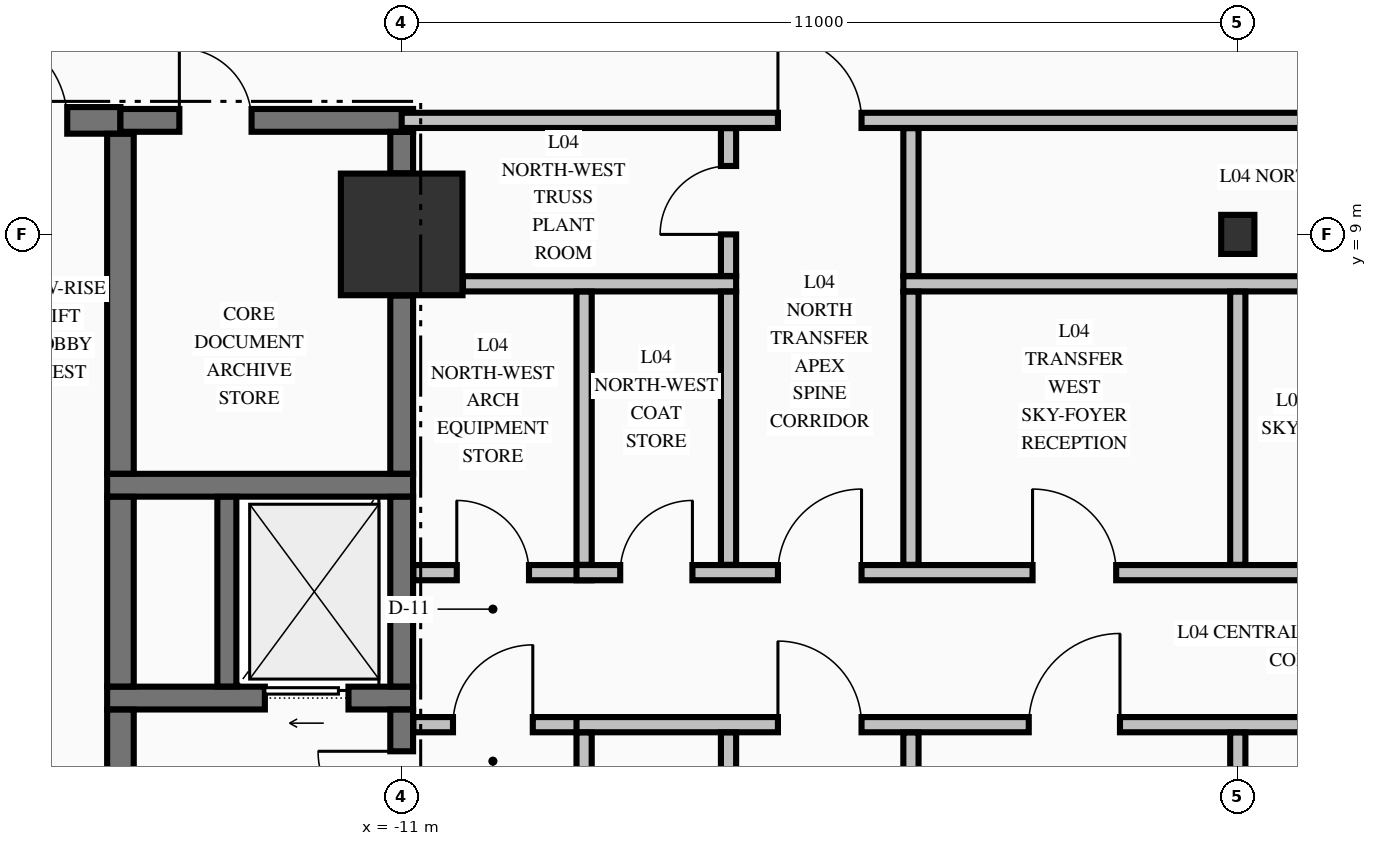
"""IFC4 building model, lengths in metres.
Left out: names, types, materials, properties, quantities, classifications, styles, units other than length and angle.
Written with IfcOpenShell. Run it as: python <this file> out.ifc"""

import sys

from ifc_helpers import new_model, si_unit, direction, frame, frame_2d, origin, origin_2d, place, context, subcontext, project, spatial, rectangle, i_section, extrude, element, fill, save


model = new_model("IFC4")
c1 = context("Model", 3, precision=1e-05, world=origin(), true_north=direction((0.0, 1.0)))
c2 = subcontext(c1, "Body", "Model", "MODEL_VIEW")
j1 = project(units=[si_unit("LENGTHUNIT", "METRE"), si_unit("PLANEANGLEUNIT", "RADIAN")], contexts=[c1])
p1 = place(None, origin())
s1 = spatial("IfcSite", under=j1, at=p1, CompositionType="ELEMENT")
p2 = place(p1, origin())
s2 = spatial("IfcBuilding", under=s1, at=p2, CompositionType="ELEMENT")
p3 = place(p2, frame((0.0, 0.0, 21.76)))
s3 = spatial("IfcBuildingStorey", under=s2, at=p3, CompositionType="ELEMENT", Elevation=21.76)
p4 = place(p3, frame((-11.0, 9.0, -0.45), z_axis=(0.0, 0.0, 1.0), x_axis=(1.0, 0.0, 0.0)))
e1 = element("IfcColumn", 1, at=p4, inside=s3, PredefinedType="COLUMN", context=c2, shape_type="SweptSolid", body=[
    extrude(rectangle(XDim=1.6, YDim=1.6, at=origin_2d()), origin(), (0.0, 0.0, 1.0), 5.44),
])
p5 = place(p3, frame((0.0, 9.0, -0.45), z_axis=(0.0, 0.0, 1.0), x_axis=(1.0, 0.0, 0.0)))
e2 = element("IfcColumn", 2, at=p5, inside=s3, PredefinedType="COLUMN", context=c2, shape_type="SweptSolid", body=[
    extrude(i_section(OverallWidth=0.437, OverallDepth=0.514, WebThickness=0.061, FlangeThickness=0.097, FilletRadius=0.015, at=origin_2d()), origin(), (0.0, 0.0, 1.0), 5.44),
])
p6 = place(p3, frame((-14.875, 2.9, 0.0), z_axis=(0.0, 0.0, 1.0), x_axis=(1.0, 0.0, 0.0)))
e3 = element("IfcWall", 3, at=p6, inside=s3, PredefinedType="SHEAR", context=c2, shape_type="SweptSolid", body=[
    extrude(rectangle(XDim=4.025, YDim=0.3, at=frame_2d((2.012, 0.0))), origin(), (0.0, 0.0, 1.0), 4.99),
])
p7 = place(p6, frame((2.075, 0.0, 0.0)))
e4 = element("IfcOpeningElement", 4, at=p7, cuts=e3, PredefinedType="OPENING", context=c2, shape_type="SweptSolid", body=[
    extrude(rectangle(XDim=1.1, YDim=2.2, at=frame_2d((0.55, 1.1))), frame((0.0, 0.16, 0.0), z_axis=(0.0, -1.0, 0.0), x_axis=(1.0, 0.0, 0.0)), (0.0, 0.0, 1.0), 0.32),
])
p8 = place(p3, frame((-14.875, 5.7, 0.0), z_axis=(0.0, 0.0, 1.0), x_axis=(1.0, 0.0, 0.0)))
e5 = element("IfcWall", 5, at=p8, inside=s3, PredefinedType="SHEAR", context=c2, shape_type="SweptSolid", body=[
    extrude(rectangle(XDim=4.025, YDim=0.3, at=frame_2d((2.012, 0.0))), origin(), (0.0, 0.0, 1.0), 4.99),
])
p9 = place(p3, frame((-20.175, 10.5, 0.0), z_axis=(0.0, 0.0, 1.0), x_axis=(1.0, 0.0, 0.0)))
e6 = element("IfcWall", 6, at=p9, inside=s3, PredefinedType="SHEAR", context=c2, shape_type="SweptSolid", body=[
    extrude(rectangle(XDim=5.475, YDim=0.35, at=frame_2d((2.738, 0.0))), origin(), (0.0, 0.0, 1.0), 4.99),
])
p10 = place(p9, frame((3.575, 0.0, 0.0)))
e7 = element("IfcOpeningElement", 7, at=p10, cuts=e6, PredefinedType="OPENING", context=c2, shape_type="SweptSolid", body=[
    extrude(rectangle(XDim=1.2, YDim=2.15, at=frame_2d((0.6, 1.075))), frame((0.0, 0.185, 0.0), z_axis=(0.0, -1.0, 0.0), x_axis=(1.0, 0.0, 0.0)), (0.0, 0.0, 1.0), 0.37),
])
p11 = place(p3, frame((-14.7, 10.5, 0.0), z_axis=(0.0, 0.0, 1.0), x_axis=(1.0, 0.0, 0.0)))
e8 = element("IfcWall", 8, at=p11, inside=s3, PredefinedType="SHEAR", context=c2, shape_type="SweptSolid", body=[
    extrude(rectangle(XDim=3.85, YDim=0.3, at=frame_2d((1.925, 0.0))), origin(), (0.0, 0.0, 1.0), 4.99),
])
p12 = place(p11, frame((0.775, 0.0, 0.0)))
e9 = element("IfcOpeningElement", 9, at=p12, cuts=e8, PredefinedType="OPENING", context=c2, shape_type="SweptSolid", body=[
    extrude(rectangle(XDim=0.95, YDim=2.15, at=frame_2d((0.475, 1.075))), frame((0.0, 0.16, 0.0), z_axis=(0.0, -1.0, 0.0), x_axis=(1.0, 0.0, 0.0)), (0.0, 0.0, 1.0), 0.32),
])
p13 = place(p3, frame((-10.847, 2.55, 0.0), z_axis=(0.0, 0.0, 1.0), x_axis=(1.0, 0.0, 0.0)))
e10 = element("IfcWall", 10, at=p13, inside=s3, PredefinedType="PARTITIONING", context=c2, shape_type="SweptSolid", body=[
    extrude(rectangle(XDim=2.347, YDim=0.2, at=frame_2d((1.173, 0.0))), origin(), (0.0, 0.0, 1.0), 4.99),
])
p14 = place(p13, frame((0.522, 0.0, 0.0)))
e11 = element("IfcOpeningElement", 11, at=p14, cuts=e10, PredefinedType="OPENING", context=c2, shape_type="SweptSolid", body=[
    extrude(rectangle(XDim=1.05, YDim=2.15, at=frame_2d((0.525, 1.075))), frame((0.0, 0.11, 0.0), z_axis=(0.0, -1.0, 0.0), x_axis=(1.0, 0.0, 0.0)), (0.0, 0.0, 1.0), 0.22),
])
p15 = place(p3, frame((-8.7, 2.55, 0.0), z_axis=(0.0, 0.0, 1.0), x_axis=(1.0, 0.0, 0.0)))
e12 = element("IfcWall", 12, at=p15, inside=s3, PredefinedType="PARTITIONING", context=c2, shape_type="SweptSolid", body=[
    extrude(rectangle(XDim=17.4, YDim=0.2, at=frame_2d((8.7, 0.0))), origin(), (0.0, 0.0, 1.0), 4.99),
])
p16 = place(p15, frame((2.65, 0.0, 0.0)))
e13 = element("IfcOpeningElement", 13, at=p16, cuts=e12, PredefinedType="OPENING", context=c2, shape_type="SweptSolid", body=[
    extrude(rectangle(XDim=1.1, YDim=2.15, at=frame_2d((0.55, 1.075))), frame((0.0, 0.11, 0.0), z_axis=(0.0, -1.0, 0.0), x_axis=(1.0, 0.0, 0.0)), (0.0, 0.0, 1.0), 0.22),
])
p17 = place(p15, frame((5.95, 0.0, 0.0)))
e14 = element("IfcOpeningElement", 14, at=p17, cuts=e12, PredefinedType="OPENING", context=c2, shape_type="SweptSolid", body=[
    extrude(rectangle(XDim=1.2, YDim=2.15, at=frame_2d((0.6, 1.075))), frame((0.0, 0.11, 0.0), z_axis=(0.0, -1.0, 0.0), x_axis=(1.0, 0.0, 0.0)), (0.0, 0.0, 1.0), 0.22),
])
p18 = place(p3, frame((-10.847, 4.55, 0.0), z_axis=(0.0, 0.0, 1.0), x_axis=(1.0, 0.0, 0.0)))
e15 = element("IfcWall", 15, at=p18, inside=s3, PredefinedType="PARTITIONING", context=c2, shape_type="SweptSolid", body=[
    extrude(rectangle(XDim=2.347, YDim=0.2, at=frame_2d((1.173, 0.0))), origin(), (0.0, 0.0, 1.0), 4.99),
])
p19 = place(p18, frame((0.572, 0.0, 0.0)))
e16 = element("IfcOpeningElement", 16, at=p19, cuts=e15, PredefinedType="OPENING", context=c2, shape_type="SweptSolid", body=[
    extrude(rectangle(XDim=0.95, YDim=2.15, at=frame_2d((0.475, 1.075))), frame((0.0, 0.11, 0.0), z_axis=(0.0, -1.0, 0.0), x_axis=(1.0, 0.0, 0.0)), (0.0, 0.0, 1.0), 0.22),
])
p20 = place(p3, frame((-8.7, 4.55, 0.0), z_axis=(0.0, 0.0, 1.0), x_axis=(1.0, 0.0, 0.0)))
e17 = element("IfcWall", 17, at=p20, inside=s3, PredefinedType="PARTITIONING", context=c2, shape_type="SweptSolid", body=[
    extrude(rectangle(XDim=17.4, YDim=0.2, at=frame_2d((8.7, 0.0))), origin(), (0.0, 0.0, 1.0), 4.99),
])
p21 = place(p20, frame((2.65, 0.0, 0.0)))
e18 = element("IfcOpeningElement", 18, at=p21, cuts=e17, PredefinedType="OPENING", context=c2, shape_type="SweptSolid", body=[
    extrude(rectangle(XDim=1.1, YDim=2.15, at=frame_2d((0.55, 1.075))), frame((0.0, 0.11, 0.0), z_axis=(0.0, -1.0, 0.0), x_axis=(1.0, 0.0, 0.0)), (0.0, 0.0, 1.0), 0.22),
])
p22 = place(p20, frame((0.575, 0.0, 0.0)))
e19 = element("IfcOpeningElement", 19, at=p22, cuts=e17, PredefinedType="OPENING", context=c2, shape_type="SweptSolid", body=[
    extrude(rectangle(XDim=0.95, YDim=2.15, at=frame_2d((0.475, 1.075))), frame((0.0, 0.11, 0.0), z_axis=(0.0, -1.0, 0.0), x_axis=(1.0, 0.0, 0.0)), (0.0, 0.0, 1.0), 0.22),
])
p23 = place(p20, frame((6.0, 0.0, 0.0)))
e20 = element("IfcOpeningElement", 20, at=p23, cuts=e17, PredefinedType="OPENING", context=c2, shape_type="SweptSolid", body=[
    extrude(rectangle(XDim=1.1, YDim=2.15, at=frame_2d((0.55, 1.075))), frame((0.0, 0.11, 0.0), z_axis=(0.0, -1.0, 0.0), x_axis=(1.0, 0.0, 0.0)), (0.0, 0.0, 1.0), 0.22),
])
p24 = place(p20, frame((12.4, 0.0, 0.0)))
e21 = element("IfcOpeningElement", 21, at=p24, cuts=e17, PredefinedType="OPENING", context=c2, shape_type="SweptSolid", body=[
    extrude(rectangle(XDim=1.2, YDim=2.15, at=frame_2d((0.6, 1.075))), frame((0.0, 0.11, 0.0), z_axis=(0.0, -1.0, 0.0), x_axis=(1.0, 0.0, 0.0)), (0.0, 0.0, 1.0), 0.22),
])
p25 = place(p3, frame((-10.194, 8.35, 0.0), z_axis=(0.0, 0.0, 1.0), x_axis=(1.0, 0.0, 0.0)))
e22 = element("IfcWall", 22, at=p25, inside=s3, PredefinedType="PARTITIONING", context=c2, shape_type="SweptSolid", body=[
    extrude(rectangle(XDim=3.594, YDim=0.2, at=frame_2d((1.797, 0.0))), origin(), (0.0, 0.0, 1.0), 3.332),
])
p26 = place(p3, frame((-4.4, 8.35, 0.0), z_axis=(0.0, 0.0, 1.0), x_axis=(1.0, 0.0, 0.0)))
e23 = element("IfcWall", 23, at=p26, inside=s3, PredefinedType="PARTITIONING", context=c2, shape_type="SweptSolid", body=[
    extrude(rectangle(XDim=14.594, YDim=0.2, at=frame_2d((7.297, 0.0))), origin(), (0.0, 0.0, 1.0), 3.332),
])
p27 = place(p3, frame((-11.0, 10.5, 0.0), z_axis=(0.0, 0.0, 1.0), x_axis=(1.0, 0.0, 0.0)))
e24 = element("IfcWall", 24, at=p27, inside=s3, PredefinedType="PARTITIONING", context=c2, shape_type="SweptSolid", body=[
    extrude(rectangle(XDim=22.0, YDim=0.2, at=frame_2d((11.0, 0.0))), origin(), (0.0, 0.0, 1.0), 3.332),
])
p28 = place(p27, frame((4.95, 0.0, 0.0)))
e25 = element("IfcOpeningElement", 25, at=p28, cuts=e24, PredefinedType="OPENING", context=c2, shape_type="SweptSolid", body=[
    extrude(rectangle(XDim=1.1, YDim=2.15, at=frame_2d((0.55, 1.075))), frame((0.0, 0.11, 0.0), z_axis=(0.0, -1.0, 0.0), x_axis=(1.0, 0.0, 0.0)), (0.0, 0.0, 1.0), 0.22),
])
p29 = place(p27, frame((15.975, 0.0, 0.0)))
e26 = element("IfcOpeningElement", 26, at=p29, cuts=e24, PredefinedType="OPENING", context=c2, shape_type="SweptSolid", body=[
    extrude(rectangle(XDim=1.05, YDim=2.15, at=frame_2d((0.525, 1.075))), frame((0.0, 0.11, 0.0), z_axis=(0.0, -1.0, 0.0), x_axis=(1.0, 0.0, 0.0)), (0.0, 0.0, 1.0), 0.22),
])
p30 = place(p3, frame((-14.7, -0.098, 0.0), z_axis=(0.0, 0.0, 1.0), x_axis=(0.0, 1.0, 0.0)))
e27 = element("IfcWall", 27, at=p30, inside=s3, PredefinedType="SHEAR", context=c2, shape_type="SweptSolid", body=[
    extrude(rectangle(XDim=2.846, YDim=0.35, at=frame_2d((1.423, 0.0))), origin(), (0.0, 0.0, 1.0), 4.99),
])
p31 = place(p3, frame((-14.7, 3.052, 0.0), z_axis=(0.0, 0.0, 1.0), x_axis=(0.0, 1.0, 0.0)))
e28 = element("IfcWall", 28, at=p31, inside=s3, PredefinedType="SHEAR", context=c2, shape_type="SweptSolid", body=[
    extrude(rectangle(XDim=2.496, YDim=0.35, at=frame_2d((1.248, 0.0))), origin(), (0.0, 0.0, 1.0), 4.99),
])
p32 = place(p3, frame((-14.7, 5.852, 0.0), z_axis=(0.0, 0.0, 1.0), x_axis=(0.0, 1.0, 0.0)))
e29 = element("IfcWall", 29, at=p32, inside=s3, PredefinedType="SHEAR", context=c2, shape_type="SweptSolid", body=[
    extrude(rectangle(XDim=4.471, YDim=0.35, at=frame_2d((2.235, 0.0))), origin(), (0.0, 0.0, 1.0), 4.99),
])
p33 = place(p3, frame((-13.3, 3.052, 0.0), z_axis=(0.0, 0.0, 1.0), x_axis=(0.0, 1.0, 0.0)))
e30 = element("IfcWall", 30, at=p33, inside=s3, PredefinedType="SOLIDWALL", context=c2, shape_type="SweptSolid", body=[
    extrude(rectangle(XDim=2.496, YDim=0.25, at=frame_2d((1.248, 0.0))), origin(), (0.0, 0.0, 1.0), 4.99),
])
p34 = place(p3, frame((-11.0, 0.804, 0.0), z_axis=(0.0, 0.0, 1.0), x_axis=(0.0, 1.0, 0.0)))
e31 = element("IfcWall", 31, at=p34, inside=s3, PredefinedType="SHEAR", context=c2, shape_type="SweptSolid", body=[
    extrude(rectangle(XDim=1.944, YDim=0.3, at=frame_2d((0.972, 0.0))), origin(), (0.0, 0.0, 1.0), 4.99),
])
p35 = place(p34, frame((0.296, 0.0, 0.0)))
e32 = element("IfcOpeningElement", 32, at=p35, cuts=e31, PredefinedType="OPENING", context=c2, shape_type="SweptSolid", body=[
    extrude(rectangle(XDim=1.1, YDim=2.15, at=frame_2d((0.55, 1.075))), frame((0.0, 0.16, 0.0), z_axis=(0.0, -1.0, 0.0), x_axis=(1.0, 0.0, 0.0)), (0.0, 0.0, 1.0), 0.32),
])
p36 = place(p3, frame((-11.0, 3.052, 0.0), z_axis=(0.0, 0.0, 1.0), x_axis=(0.0, 1.0, 0.0)))
e33 = element("IfcWall", 33, at=p36, inside=s3, PredefinedType="SHEAR", context=c2, shape_type="SweptSolid", body=[
    extrude(rectangle(XDim=2.496, YDim=0.3, at=frame_2d((1.248, 0.0))), origin(), (0.0, 0.0, 1.0), 4.99),
])
p37 = place(p3, frame((-11.0, 5.852, 0.0), z_axis=(0.0, 0.0, 1.0), x_axis=(0.0, 1.0, 0.0)))
e34 = element("IfcWall", 34, at=p37, inside=s3, PredefinedType="SHEAR", context=c2, shape_type="SweptSolid", body=[
    extrude(rectangle(XDim=2.344, YDim=0.3, at=frame_2d((1.172, 0.0))), origin(), (0.0, 0.0, 1.0), 4.99),
])
p38 = place(p3, frame((-11.0, 9.804, 0.0), z_axis=(0.0, 0.0, 1.0), x_axis=(0.0, 1.0, 0.0)))
e35 = element("IfcWall", 35, at=p38, inside=s3, PredefinedType="SHEAR", context=c2, shape_type="SweptSolid", body=[
    extrude(rectangle(XDim=0.544, YDim=0.3, at=frame_2d((0.272, 0.0))), origin(), (0.0, 0.0, 1.0), 4.99),
])
p39 = place(p3, frame((-8.6, -8.247, 0.0), z_axis=(0.0, 0.0, 1.0), x_axis=(0.0, 1.0, 0.0)))
e36 = element("IfcWall", 36, at=p39, inside=s3, PredefinedType="PARTITIONING", context=c2, shape_type="SweptSolid", body=[
    extrude(rectangle(XDim=10.694, YDim=0.2, at=frame_2d((5.347, 0.0))), origin(), (0.0, 0.0, 1.0), 4.99),
])
p40 = place(p39, frame((4.772, 0.0, 0.0)))
e37 = element("IfcOpeningElement", 37, at=p40, cuts=e36, PredefinedType="OPENING", context=c2, shape_type="SweptSolid", body=[
    extrude(rectangle(XDim=0.95, YDim=2.15, at=frame_2d((0.475, 1.075))), frame((0.0, 0.11, 0.0), z_axis=(0.0, -1.0, 0.0), x_axis=(1.0, 0.0, 0.0)), (0.0, 0.0, 1.0), 0.22),
])
p41 = place(p3, frame((-8.6, 4.653, 0.0), z_axis=(0.0, 0.0, 1.0), x_axis=(0.0, 1.0, 0.0)))
e38 = element("IfcWall", 38, at=p41, inside=s3, PredefinedType="PARTITIONING", context=c2, shape_type="SweptSolid", body=[
    extrude(rectangle(XDim=3.594, YDim=0.2, at=frame_2d((1.797, 0.0))), origin(), (0.0, 0.0, 1.0), 4.99),
])
p42 = place(p3, frame((-6.7, -8.247, 0.0), z_axis=(0.0, 0.0, 1.0), x_axis=(0.0, 1.0, 0.0)))
e39 = element("IfcWall", 39, at=p42, inside=s3, PredefinedType="PARTITIONING", context=c2, shape_type="SweptSolid", body=[
    extrude(rectangle(XDim=10.694, YDim=0.2, at=frame_2d((5.347, 0.0))), origin(), (0.0, 0.0, 1.0), 4.99),
])
p43 = place(p3, frame((-6.7, 4.653, 0.0), z_axis=(0.0, 0.0, 1.0), x_axis=(0.0, 1.0, 0.0)))
e40 = element("IfcWall", 40, at=p43, inside=s3, PredefinedType="PARTITIONING", context=c2, shape_type="SweptSolid", body=[
    extrude(rectangle(XDim=3.594, YDim=0.2, at=frame_2d((1.797, 0.0))), origin(), (0.0, 0.0, 1.0), 4.99),
])
p44 = place(p3, frame((-6.7, 8.453, 0.0), z_axis=(0.0, 0.0, 1.0), x_axis=(0.0, 1.0, 0.0)))
e41 = element("IfcWall", 41, at=p44, inside=s3, PredefinedType="PARTITIONING", context=c2, shape_type="SweptSolid", body=[
    extrude(rectangle(XDim=1.944, YDim=0.2, at=frame_2d((0.972, 0.0))), origin(), (0.0, 0.0, 1.0), 4.99),
])
p45 = place(p44, frame((0.547, 0.0, 0.0)))
e42 = element("IfcOpeningElement", 42, at=p45, cuts=e41, PredefinedType="OPENING", context=c2, shape_type="SweptSolid", body=[
    extrude(rectangle(XDim=0.9, YDim=2.15, at=frame_2d((0.45, 1.075))), frame((0.0, 0.11, 0.0), z_axis=(0.0, -1.0, 0.0), x_axis=(1.0, 0.0, 0.0)), (0.0, 0.0, 1.0), 0.22),
])
p46 = place(p3, frame((-4.3, -8.247, 0.0), z_axis=(0.0, 0.0, 1.0), x_axis=(0.0, 1.0, 0.0)))
e43 = element("IfcWall", 43, at=p46, inside=s3, PredefinedType="PARTITIONING", context=c2, shape_type="SweptSolid", body=[
    extrude(rectangle(XDim=10.694, YDim=0.2, at=frame_2d((5.347, 0.0))), origin(), (0.0, 0.0, 1.0), 4.99),
])
p47 = place(p3, frame((-4.3, 4.653, 0.0), z_axis=(0.0, 0.0, 1.0), x_axis=(0.0, 1.0, 0.0)))
e44 = element("IfcWall", 44, at=p47, inside=s3, PredefinedType="PARTITIONING", context=c2, shape_type="SweptSolid", body=[
    extrude(rectangle(XDim=3.594, YDim=0.2, at=frame_2d((1.797, 0.0))), origin(), (0.0, 0.0, 1.0), 4.99),
])
p48 = place(p3, frame((-4.3, 8.453, 0.0), z_axis=(0.0, 0.0, 1.0), x_axis=(0.0, 1.0, 0.0)))
e45 = element("IfcWall", 45, at=p48, inside=s3, PredefinedType="PARTITIONING", context=c2, shape_type="SweptSolid", body=[
    extrude(rectangle(XDim=1.944, YDim=0.2, at=frame_2d((0.972, 0.0))), origin(), (0.0, 0.0, 1.0), 4.99),
])
p49 = place(p3, frame((0.0, 0.706, 0.0), z_axis=(0.0, 0.0, 1.0), x_axis=(0.0, 1.0, 0.0)))
e46 = element("IfcWall", 46, at=p49, inside=s3, PredefinedType="PARTITIONING", context=c2, shape_type="SweptSolid", body=[
    extrude(rectangle(XDim=1.741, YDim=0.2, at=frame_2d((0.871, 0.0))), origin(), (0.0, 0.0, 1.0), 3.332),
])
p50 = place(p3, frame((0.0, 4.653, 0.0), z_axis=(0.0, 0.0, 1.0), x_axis=(0.0, 1.0, 0.0)))
e47 = element("IfcWall", 47, at=p50, inside=s3, PredefinedType="PARTITIONING", context=c2, shape_type="SweptSolid", body=[
    extrude(rectangle(XDim=3.594, YDim=0.2, at=frame_2d((1.797, 0.0))), origin(), (0.0, 0.0, 1.0), 3.332),
])
p51 = place(p35, origin())
e48 = element("IfcDoor", 48, at=p51, inside=s3, OperationType="SINGLE_SWING_RIGHT", PredefinedType="DOOR", context=c2, shape_type="SweptSolid", body=[
    extrude(rectangle(XDim=1.1, YDim=2.15, at=frame_2d((0.55, 1.075))), frame((0.0, 0.025, 0.0), z_axis=(0.0, -1.0, 0.0), x_axis=(1.0, 0.0, 0.0)), (0.0, 0.0, 1.0), 0.05),
])
fill(e32, e48)
p52 = place(p7, origin())
e49 = element("IfcDoor", 49, at=p52, inside=s3, OperationType="SLIDING_TO_LEFT", PredefinedType="DOOR", context=c2, shape_type="SweptSolid", body=[
    extrude(rectangle(XDim=1.1, YDim=2.2, at=frame_2d((0.55, 1.1))), frame((0.0, 0.025, 0.0), z_axis=(0.0, -1.0, 0.0), x_axis=(1.0, 0.0, 0.0)), (0.0, 0.0, 1.0), 0.05),
])
fill(e4, e49)
p53 = place(p12, origin())
e50 = element("IfcDoor", 50, at=p53, inside=s3, OperationType="SINGLE_SWING_LEFT", PredefinedType="DOOR", context=c2, shape_type="SweptSolid", body=[
    extrude(rectangle(XDim=0.95, YDim=2.15, at=frame_2d((0.475, 1.075))), frame((0.0, 0.025, 0.0), z_axis=(0.0, -1.0, 0.0), x_axis=(1.0, 0.0, 0.0)), (0.0, 0.0, 1.0), 0.05),
])
fill(e9, e50)
p54 = place(p10, origin())
e51 = element("IfcDoor", 51, at=p54, inside=s3, OperationType="SINGLE_SWING_LEFT", PredefinedType="DOOR", context=c2, shape_type="SweptSolid", body=[
    extrude(rectangle(XDim=1.2, YDim=2.15, at=frame_2d((0.6, 1.075))), frame((0.0, 0.025, 0.0), z_axis=(0.0, -1.0, 0.0), x_axis=(1.0, 0.0, 0.0)), (0.0, 0.0, 1.0), 0.05),
])
fill(e7, e51)
p55 = place(p14, origin())
e52 = element("IfcDoor", 52, at=p55, inside=s3, OperationType="SINGLE_SWING_RIGHT", PredefinedType="DOOR", context=c2, shape_type="SweptSolid", body=[
    extrude(rectangle(XDim=1.05, YDim=2.15, at=frame_2d((0.525, 1.075))), frame((0.0, 0.025, 0.0), z_axis=(0.0, -1.0, 0.0), x_axis=(1.0, 0.0, 0.0)), (0.0, 0.0, 1.0), 0.05),
])
fill(e11, e52)
p56 = place(p19, origin())
e53 = element("IfcDoor", 53, at=p56, inside=s3, OperationType="SINGLE_SWING_LEFT", PredefinedType="DOOR", context=c2, shape_type="SweptSolid", body=[
    extrude(rectangle(XDim=0.95, YDim=2.15, at=frame_2d((0.475, 1.075))), frame((0.0, 0.025, 0.0), z_axis=(0.0, -1.0, 0.0), x_axis=(1.0, 0.0, 0.0)), (0.0, 0.0, 1.0), 0.05),
])
fill(e16, e53)
p57 = place(p16, origin())
e54 = element("IfcDoor", 54, at=p57, inside=s3, OperationType="SINGLE_SWING_LEFT", PredefinedType="DOOR", context=c2, shape_type="SweptSolid", body=[
    extrude(rectangle(XDim=1.1, YDim=2.15, at=frame_2d((0.55, 1.075))), frame((0.0, 0.025, 0.0), z_axis=(0.0, -1.0, 0.0), x_axis=(1.0, 0.0, 0.0)), (0.0, 0.0, 1.0), 0.05),
])
fill(e13, e54)
p58 = place(p21, origin())
e55 = element("IfcDoor", 55, at=p58, inside=s3, OperationType="SINGLE_SWING_RIGHT", PredefinedType="DOOR", context=c2, shape_type="SweptSolid", body=[
    extrude(rectangle(XDim=1.1, YDim=2.15, at=frame_2d((0.55, 1.075))), frame((0.0, 0.025, 0.0), z_axis=(0.0, -1.0, 0.0), x_axis=(1.0, 0.0, 0.0)), (0.0, 0.0, 1.0), 0.05),
])
fill(e18, e55)
p59 = place(p28, origin())
e56 = element("IfcDoor", 56, at=p59, inside=s3, OperationType="SINGLE_SWING_LEFT", PredefinedType="DOOR", context=c2, shape_type="SweptSolid", body=[
    extrude(rectangle(XDim=1.1, YDim=2.15, at=frame_2d((0.55, 1.075))), frame((0.0, 0.025, 0.0), z_axis=(0.0, -1.0, 0.0), x_axis=(1.0, 0.0, 0.0)), (0.0, 0.0, 1.0), 0.05),
])
fill(e25, e56)
p60 = place(p17, origin())
e57 = element("IfcDoor", 57, at=p60, inside=s3, OperationType="SINGLE_SWING_RIGHT", PredefinedType="DOOR", context=c2, shape_type="SweptSolid", body=[
    extrude(rectangle(XDim=1.2, YDim=2.15, at=frame_2d((0.6, 1.075))), frame((0.0, 0.025, 0.0), z_axis=(0.0, -1.0, 0.0), x_axis=(1.0, 0.0, 0.0)), (0.0, 0.0, 1.0), 0.05),
])
fill(e14, e57)
p61 = place(p22, origin())
e58 = element("IfcDoor", 58, at=p61, inside=s3, OperationType="SINGLE_SWING_RIGHT", PredefinedType="DOOR", context=c2, shape_type="SweptSolid", body=[
    extrude(rectangle(XDim=0.95, YDim=2.15, at=frame_2d((0.475, 1.075))), frame((0.0, 0.025, 0.0), z_axis=(0.0, -1.0, 0.0), x_axis=(1.0, 0.0, 0.0)), (0.0, 0.0, 1.0), 0.05),
])
fill(e19, e58)
p62 = place(p23, origin())
e59 = element("IfcDoor", 59, at=p62, inside=s3, OperationType="SINGLE_SWING_LEFT", PredefinedType="DOOR", context=c2, shape_type="SweptSolid", body=[
    extrude(rectangle(XDim=1.1, YDim=2.15, at=frame_2d((0.55, 1.075))), frame((0.0, 0.025, 0.0), z_axis=(0.0, -1.0, 0.0), x_axis=(1.0, 0.0, 0.0)), (0.0, 0.0, 1.0), 0.05),
])
fill(e20, e59)
p63 = place(p45, origin())
e60 = element("IfcDoor", 60, at=p63, inside=s3, OperationType="SINGLE_SWING_LEFT", PredefinedType="DOOR", context=c2, shape_type="SweptSolid", body=[
    extrude(rectangle(XDim=0.9, YDim=2.15, at=frame_2d((0.45, 1.075))), frame((0.0, 0.025, 0.0), z_axis=(0.0, -1.0, 0.0), x_axis=(1.0, 0.0, 0.0)), (0.0, 0.0, 1.0), 0.05),
])
fill(e42, e60)
save(model, sys.argv[1])
